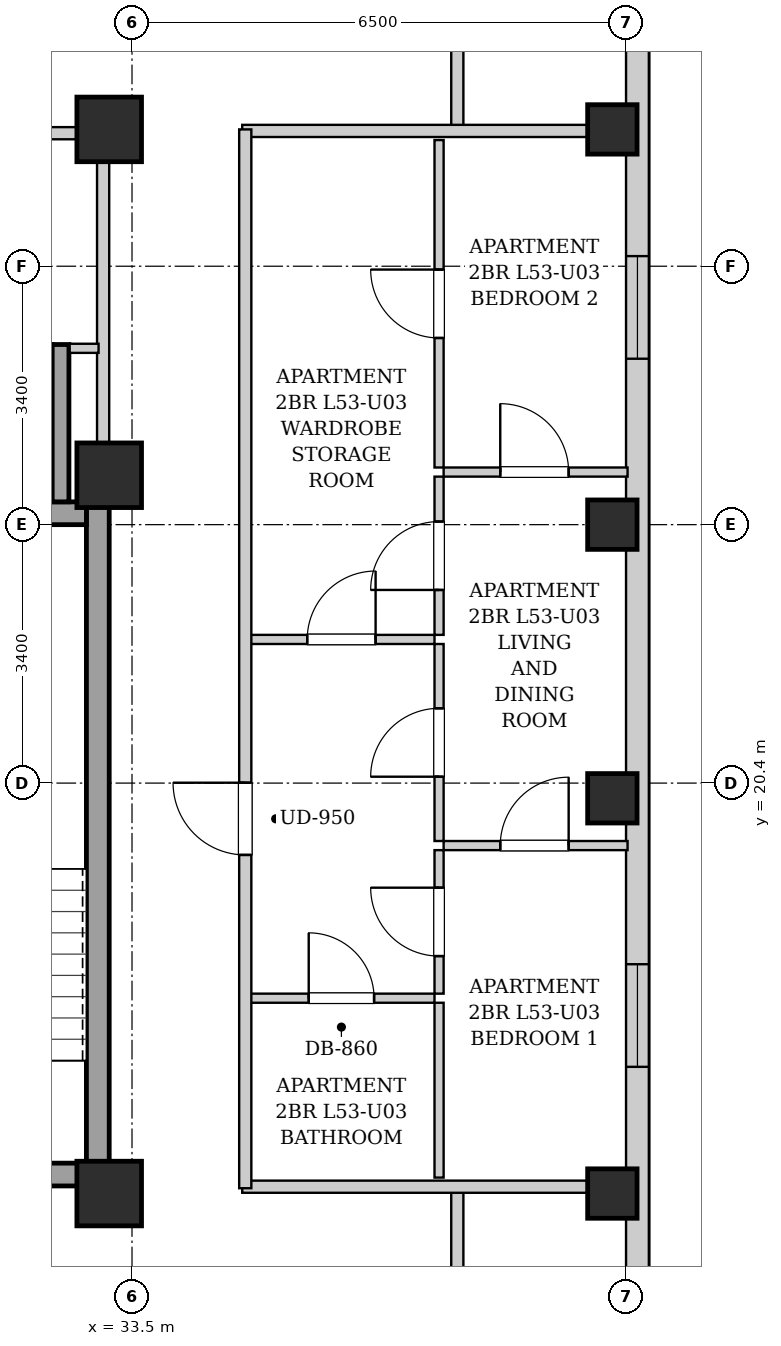
"""IFC4 building model, lengths in metres.
Left out: names, types, materials, properties, quantities, classifications, styles, units other than length and angle.
Written with IfcOpenShell. Run it as: python <this file> out.ifc"""

import sys

from ifc_helpers import new_model, si_unit, direction, frame, frame_2d, origin, origin_2d, place, context, subcontext, project, spatial, rectangle, extrude, element, fill, save


model = new_model("IFC4")
c1 = context("Model", 3, precision=1e-05, world=origin(), true_north=direction((0.0, 1.0)))
c2 = subcontext(c1, "Body", "Model", "MODEL_VIEW")
j1 = project(units=[si_unit("LENGTHUNIT", "METRE"), si_unit("PLANEANGLEUNIT", "RADIAN")], contexts=[c1])
p1 = place(None, origin())
s1 = spatial("IfcSite", under=j1, at=p1, CompositionType="ELEMENT")
p2 = place(p1, origin())
s2 = spatial("IfcBuilding", under=s1, at=p2, CompositionType="ELEMENT")
p3 = place(p2, frame((0.0, 0.0, 184.3)))
s3 = spatial("IfcBuildingStorey", under=s2, at=p3, CompositionType="ELEMENT", Elevation=184.3)
for number, where, z_axis, x_axis in (
    (1, (39.82, 15.0, 0.0), (0.0, 0.0, 1.0), (1.0, 0.0, 0.0)),
    (2, (39.82, 20.2, 0.0), (0.0, 0.0, 1.0), (1.0, 0.0, 0.0)),
    (3, (39.82, 23.8, 0.0), (0.0, 0.0, 1.0), (1.0, 0.0, 0.0)),
    (4, (39.82, 29.0, 0.0), (0.0, 0.0, 1.0), (1.0, 0.0, 0.0)),
):
    element("IfcColumn", number, at=place(p3, frame(where, z_axis=z_axis, x_axis=x_axis)), inside=s3, PredefinedType="COLUMN", context=c2, shape_type="SweptSolid", body=[
        extrude(rectangle(XDim=0.65, YDim=0.65, at=origin_2d()), origin(), (0.0, 0.0, 1.0), 3.3),
    ])
for number, where, z_axis, x_axis in (
    (5, (33.2, 15.0, 0.0), (0.0, 0.0, 1.0), (1.0, 0.0, 0.0)),
    (6, (33.2, 29.0, 0.0), (0.0, 0.0, 1.0), (1.0, 0.0, 0.0)),
    (7, (33.2, 24.45, 0.0), (0.0, 0.0, 1.0), (1.0, 0.0, 0.0)),
):
    element("IfcColumn", number, at=place(p3, frame(where, z_axis=z_axis, x_axis=x_axis)), inside=s3, PredefinedType="COLUMN", context=c2, shape_type="SweptSolid", body=[
        extrude(rectangle(XDim=0.85, YDim=0.85, at=origin_2d()), origin(), (0.0, 0.0, 1.0), 3.3),
    ])
p4 = place(p3, frame((40.15, 37.7, 0.0), z_axis=(0.0, 0.0, 1.0), x_axis=(0.0, -1.0, 0.0)))
e8 = element("IfcWall", 8, at=p4, inside=s3, PredefinedType="SOLIDWALL", context=c2, shape_type="SweptSolid", body=[
    extrude(rectangle(XDim=31.4, YDim=0.3, at=frame_2d((15.7, 0.0))), origin(), (0.0, 0.0, 1.0), 3.04),
])
p5 = place(p4, frame((28.396, 0.0, 0.55)))
e9 = element("IfcOpeningElement", 9, at=p5, cuts=e8, PredefinedType="OPENING", context=c2, shape_type="SweptSolid", body=[
    extrude(rectangle(XDim=1.35, YDim=1.2, at=frame_2d((0.675, 0.6))), frame((0.0, 0.16, 0.0), z_axis=(0.0, -1.0, 0.0), x_axis=(1.0, 0.0, 0.0)), (0.0, 0.0, 1.0), 0.32),
])
p6 = place(p4, frame((1.653, 0.0, 0.55)))
e10 = element("IfcOpeningElement", 10, at=p6, cuts=e8, PredefinedType="OPENING", context=c2, shape_type="SweptSolid", body=[
    extrude(rectangle(XDim=1.35, YDim=1.2, at=frame_2d((0.675, 0.6))), frame((0.0, 0.16, 0.0), z_axis=(0.0, -1.0, 0.0), x_axis=(1.0, 0.0, 0.0)), (0.0, 0.0, 1.0), 0.32),
])
p7 = place(p4, frame((19.683, 0.0, 0.55)))
e11 = element("IfcOpeningElement", 11, at=p7, cuts=e8, PredefinedType="OPENING", context=c2, shape_type="SweptSolid", body=[
    extrude(rectangle(XDim=1.35, YDim=1.2, at=frame_2d((0.675, 0.6))), frame((0.0, 0.16, 0.0), z_axis=(0.0, -1.0, 0.0), x_axis=(1.0, 0.0, 0.0)), (0.0, 0.0, 1.0), 0.32),
])
p8 = place(p4, frame((10.367, 0.0, 0.55)))
e12 = element("IfcOpeningElement", 12, at=p8, cuts=e8, PredefinedType="OPENING", context=c2, shape_type="SweptSolid", body=[
    extrude(rectangle(XDim=1.35, YDim=1.2, at=frame_2d((0.675, 0.6))), frame((0.0, 0.16, 0.0), z_axis=(0.0, -1.0, 0.0), x_axis=(1.0, 0.0, 0.0)), (0.0, 0.0, 1.0), 0.32),
])
p9 = place(p3, frame((33.05, 15.1, 0.0), z_axis=(0.0, 0.0, 1.0), x_axis=(0.0, 1.0, 0.0)))
e13 = element("IfcWall", 13, at=p9, inside=s3, PredefinedType="SHEAR", context=c2, shape_type="SweptSolid", body=[
    extrude(rectangle(XDim=9.0, YDim=0.3, at=frame_2d((4.5, 0.0))), origin(), (0.0, 0.0, 1.0), 3.04),
])
p10 = place(p3, frame((30.05, 23.95, 0.0), z_axis=(0.0, 0.0, 1.0), x_axis=(1.0, 0.0, 0.0)))
e14 = element("IfcWall", 14, at=p10, inside=s3, PredefinedType="SHEAR", context=c2, shape_type="SweptSolid", body=[
    extrude(rectangle(XDim=2.85, YDim=0.3, at=frame_2d((1.425, 0.0))), origin(), (0.0, 0.0, 1.0), 3.04),
])
p11 = place(p3, frame((30.05, 15.25, 0.0), z_axis=(0.0, 0.0, 1.0), x_axis=(1.0, 0.0, 0.0)))
e15 = element("IfcWall", 15, at=p11, inside=s3, PredefinedType="SHEAR", context=c2, shape_type="SweptSolid", body=[
    extrude(rectangle(XDim=2.85, YDim=0.3, at=frame_2d((1.425, 0.0))), origin(), (0.0, 0.0, 1.0), 3.04),
])
p12 = place(p11, frame((0.86, 0.0, 0.0)))
e16 = element("IfcOpeningElement", 16, at=p12, cuts=e15, PredefinedType="OPENING", context=c2, shape_type="SweptSolid", body=[
    extrude(rectangle(XDim=1.1, YDim=2.05, at=frame_2d((0.55, 1.025))), frame((0.0, 0.16, 0.0), z_axis=(0.0, -1.0, 0.0), x_axis=(1.0, 0.0, 0.0)), (0.0, 0.0, 1.0), 0.32),
])
p13 = place(p3, frame((32.56, 24.1, 0.0), z_axis=(0.0, 0.0, 1.0), x_axis=(0.0, 1.0, 0.0)))
e17 = element("IfcWall", 17, at=p13, inside=s3, PredefinedType="SHEAR", context=c2, shape_type="SweptSolid", body=[
    extrude(rectangle(XDim=2.07, YDim=0.22, at=frame_2d((1.035, 0.0))), origin(), (0.0, 0.0, 1.0), 3.04),
])
p14 = place(p3, frame((33.12, 24.12, 0.0), z_axis=(0.0, 0.0, 1.0), x_axis=(0.0, 1.0, 0.0)))
e18 = element("IfcWall", 18, at=p14, inside=s3, PredefinedType="PARTITIONING", context=c2, shape_type="SweptSolid", body=[
    extrude(rectangle(XDim=4.76, YDim=0.16, at=frame_2d((2.38, 0.0))), origin(), (0.0, 0.0, 1.0), 3.04),
])
p15 = place(p3, frame((32.68, 26.12, 0.0), z_axis=(0.0, 0.0, 1.0), x_axis=(1.0, 0.0, 0.0)))
e19 = element("IfcWall", 19, at=p15, inside=s3, PredefinedType="PARTITIONING", context=c2, shape_type="SweptSolid", body=[
    extrude(rectangle(XDim=0.38, YDim=0.12, at=frame_2d((0.19, 0.0))), origin(), (0.0, 0.0, 1.0), 3.04),
])
p16 = place(p3, frame((30.08, 28.95, 0.0), z_axis=(0.0, 0.0, 1.0), x_axis=(1.0, 0.0, 0.0)))
e20 = element("IfcWall", 20, at=p16, inside=s3, PredefinedType="PARTITIONING", context=c2, shape_type="SweptSolid", body=[
    extrude(rectangle(XDim=2.96, YDim=0.16, at=frame_2d((1.48, 0.0))), origin(), (0.0, 0.0, 1.0), 3.04),
])
p17 = place(p16, frame((1.045, 0.0, 0.0)))
e21 = element("IfcOpeningElement", 21, at=p17, cuts=e20, PredefinedType="OPENING", context=c2, shape_type="SweptSolid", body=[
    extrude(rectangle(XDim=0.86, YDim=2.05, at=frame_2d((0.43, 1.025))), frame((0.0, 0.09, 0.0), z_axis=(0.0, -1.0, 0.0), x_axis=(1.0, 0.0, 0.0)), (0.0, 0.0, 1.0), 0.18),
])
for number, where, z_axis, x_axis in (
    (22, (37.78, 13.51, 0.0), (0.0, 0.0, 1.0), (0.0, 1.0, 0.0)),
    (23, (37.78, 28.98, 0.0), (0.0, 0.0, 1.0), (0.0, 1.0, 0.0)),
):
    element("IfcWall", number, at=place(p3, frame(where, z_axis=z_axis, x_axis=x_axis)), inside=s3, PredefinedType="PARTITIONING", context=c2, shape_type="SweptSolid", body=[
        extrude(rectangle(XDim=1.58, YDim=0.16, at=frame_2d((0.79, 0.0))), origin(), (0.0, 0.0, 1.0), 3.04),
    ])
for number, where, z_axis, x_axis in (
    (24, (34.95, 15.09, 0.0), (0.0, 0.0, 1.0), (1.0, 0.0, 0.0)),
    (25, (34.95, 28.98, 0.0), (0.0, 0.0, 1.0), (1.0, 0.0, 0.0)),
):
    element("IfcWall", number, at=place(p3, frame(where, z_axis=z_axis, x_axis=x_axis)), inside=s3, PredefinedType="PARTITIONING", context=c2, shape_type="SweptSolid", body=[
        extrude(rectangle(XDim=5.07, YDim=0.16, at=frame_2d((2.535, 0.0))), origin(), (0.0, 0.0, 1.0), 2.556),
    ])
p18 = place(p3, frame((35.03, 22.29, 0.0), z_axis=(0.0, 0.0, 1.0), x_axis=(1.0, 0.0, 0.0)))
e26 = element("IfcWall", 26, at=p18, inside=s3, PredefinedType="PARTITIONING", context=c2, shape_type="SweptSolid", body=[
    extrude(rectangle(XDim=2.45, YDim=0.12, at=frame_2d((1.225, 0.0))), origin(), (0.0, 0.0, 1.0), 3.04),
])
p19 = place(p18, frame((0.775, 0.0, 0.0)))
e27 = element("IfcOpeningElement", 27, at=p19, cuts=e26, PredefinedType="OPENING", context=c2, shape_type="SweptSolid", body=[
    extrude(rectangle(XDim=0.9, YDim=2.05, at=frame_2d((0.45, 1.025))), frame((0.0, 0.07, 0.0), z_axis=(0.0, -1.0, 0.0), x_axis=(1.0, 0.0, 0.0)), (0.0, 0.0, 1.0), 0.14),
])
p20 = place(p3, frame((37.54, 22.35, 0.0), z_axis=(0.0, 0.0, 1.0), x_axis=(0.0, 1.0, 0.0)))
e28 = element("IfcWall", 28, at=p20, inside=s3, PredefinedType="PARTITIONING", context=c2, shape_type="SweptSolid", body=[
    extrude(rectangle(XDim=2.082, YDim=0.12, at=frame_2d((1.041, 0.0))), origin(), (0.0, 0.0, 1.0), 3.04),
])
p21 = place(p20, frame((0.591, 0.0, 0.0)))
e29 = element("IfcOpeningElement", 29, at=p21, cuts=e28, PredefinedType="OPENING", context=c2, shape_type="SweptSolid", body=[
    extrude(rectangle(XDim=0.9, YDim=2.05, at=frame_2d((0.45, 1.025))), frame((0.0, 0.07, 0.0), z_axis=(0.0, -1.0, 0.0), x_axis=(1.0, 0.0, 0.0)), (0.0, 0.0, 1.0), 0.14),
])
p22 = place(p3, frame((37.54, 24.552, 0.0), z_axis=(0.0, 0.0, 1.0), x_axis=(0.0, 1.0, 0.0)))
e30 = element("IfcWall", 30, at=p22, inside=s3, PredefinedType="PARTITIONING", context=c2, shape_type="SweptSolid", body=[
    extrude(rectangle(XDim=4.308, YDim=0.12, at=frame_2d((2.154, 0.0))), origin(), (0.0, 0.0, 1.0), 3.04),
])
p23 = place(p22, frame((1.704, 0.0, 0.0)))
e31 = element("IfcOpeningElement", 31, at=p23, cuts=e30, PredefinedType="OPENING", context=c2, shape_type="SweptSolid", body=[
    extrude(rectangle(XDim=0.9, YDim=2.05, at=frame_2d((0.45, 1.025))), frame((0.0, 0.07, 0.0), z_axis=(0.0, -1.0, 0.0), x_axis=(1.0, 0.0, 0.0)), (0.0, 0.0, 1.0), 0.14),
])
p24 = place(p3, frame((35.03, 17.57, 0.0), z_axis=(0.0, 0.0, 1.0), x_axis=(1.0, 0.0, 0.0)))
e32 = element("IfcWall", 32, at=p24, inside=s3, PredefinedType="PARTITIONING", context=c2, shape_type="SweptSolid", body=[
    extrude(rectangle(XDim=2.45, YDim=0.12, at=frame_2d((1.225, 0.0))), origin(), (0.0, 0.0, 1.0), 3.04),
])
p25 = place(p24, frame((0.795, 0.0, 0.0)))
e33 = element("IfcOpeningElement", 33, at=p25, cuts=e32, PredefinedType="OPENING", context=c2, shape_type="SweptSolid", body=[
    extrude(rectangle(XDim=0.86, YDim=2.05, at=frame_2d((0.43, 1.025))), frame((0.0, 0.07, 0.0), z_axis=(0.0, -1.0, 0.0), x_axis=(1.0, 0.0, 0.0)), (0.0, 0.0, 1.0), 0.14),
])
p26 = place(p3, frame((37.54, 15.21, 0.0), z_axis=(0.0, 0.0, 1.0), x_axis=(0.0, 1.0, 0.0)))
e34 = element("IfcWall", 34, at=p26, inside=s3, PredefinedType="PARTITIONING", context=c2, shape_type="SweptSolid", body=[
    extrude(rectangle(XDim=2.3, YDim=0.12, at=frame_2d((1.15, 0.0))), origin(), (0.0, 0.0, 1.0), 3.04),
])
p27 = place(p3, frame((37.54, 17.63, 0.0), z_axis=(0.0, 0.0, 1.0), x_axis=(0.0, 1.0, 0.0)))
e35 = element("IfcWall", 35, at=p27, inside=s3, PredefinedType="PARTITIONING", context=c2, shape_type="SweptSolid", body=[
    extrude(rectangle(XDim=1.888, YDim=0.12, at=frame_2d((0.944, 0.0))), origin(), (0.0, 0.0, 1.0), 3.04),
])
p28 = place(p27, frame((0.494, 0.0, 0.0)))
e36 = element("IfcOpeningElement", 36, at=p28, cuts=e35, PredefinedType="OPENING", context=c2, shape_type="SweptSolid", body=[
    extrude(rectangle(XDim=0.9, YDim=2.05, at=frame_2d((0.45, 1.025))), frame((0.0, 0.07, 0.0), z_axis=(0.0, -1.0, 0.0), x_axis=(1.0, 0.0, 0.0)), (0.0, 0.0, 1.0), 0.14),
])
p29 = place(p3, frame((37.54, 19.638, 0.0), z_axis=(0.0, 0.0, 1.0), x_axis=(0.0, 1.0, 0.0)))
e37 = element("IfcWall", 37, at=p29, inside=s3, PredefinedType="PARTITIONING", context=c2, shape_type="SweptSolid", body=[
    extrude(rectangle(XDim=2.592, YDim=0.12, at=frame_2d((1.296, 0.0))), origin(), (0.0, 0.0, 1.0), 3.04),
])
p30 = place(p29, frame((0.846, 0.0, 0.0)))
e38 = element("IfcOpeningElement", 38, at=p30, cuts=e37, PredefinedType="OPENING", context=c2, shape_type="SweptSolid", body=[
    extrude(rectangle(XDim=0.9, YDim=2.05, at=frame_2d((0.45, 1.025))), frame((0.0, 0.07, 0.0), z_axis=(0.0, -1.0, 0.0), x_axis=(1.0, 0.0, 0.0)), (0.0, 0.0, 1.0), 0.14),
])
p31 = place(p3, frame((37.6, 19.578, 0.0), z_axis=(0.0, 0.0, 1.0), x_axis=(1.0, 0.0, 0.0)))
e39 = element("IfcWall", 39, at=p31, inside=s3, PredefinedType="PARTITIONING", context=c2, shape_type="SweptSolid", body=[
    extrude(rectangle(XDim=2.42, YDim=0.12, at=frame_2d((1.21, 0.0))), origin(), (0.0, 0.0, 1.0), 3.04),
])
p32 = place(p31, frame((0.745, 0.0, 0.0)))
e40 = element("IfcOpeningElement", 40, at=p32, cuts=e39, PredefinedType="OPENING", context=c2, shape_type="SweptSolid", body=[
    extrude(rectangle(XDim=0.9, YDim=2.05, at=frame_2d((0.45, 1.025))), frame((0.0, 0.07, 0.0), z_axis=(0.0, -1.0, 0.0), x_axis=(1.0, 0.0, 0.0)), (0.0, 0.0, 1.0), 0.14),
])
p33 = place(p3, frame((37.6, 24.492, 0.0), z_axis=(0.0, 0.0, 1.0), x_axis=(1.0, 0.0, 0.0)))
e41 = element("IfcWall", 41, at=p33, inside=s3, PredefinedType="PARTITIONING", context=c2, shape_type="SweptSolid", body=[
    extrude(rectangle(XDim=2.42, YDim=0.12, at=frame_2d((1.21, 0.0))), origin(), (0.0, 0.0, 1.0), 2.722),
])
p34 = place(p33, frame((0.745, 0.0, 0.0)))
e42 = element("IfcOpeningElement", 42, at=p34, cuts=e41, PredefinedType="OPENING", context=c2, shape_type="SweptSolid", body=[
    extrude(rectangle(XDim=0.9, YDim=2.05, at=frame_2d((0.45, 1.025))), frame((0.0, 0.07, 0.0), z_axis=(0.0, -1.0, 0.0), x_axis=(1.0, 0.0, 0.0)), (0.0, 0.0, 1.0), 0.14),
])
p35 = place(p3, frame((34.99, 15.07, 0.0), z_axis=(0.0, 0.0, 1.0), x_axis=(0.0, 1.0, 0.0)))
e43 = element("IfcWall", 43, at=p35, inside=s3, PredefinedType="PARTITIONING", context=c2, shape_type="SweptSolid", body=[
    extrude(rectangle(XDim=13.93, YDim=0.16, at=frame_2d((6.965, 0.0))), origin(), (0.0, 0.0, 1.0), 3.04),
])
p36 = place(p35, frame((4.385, 0.0, 0.0)))
e44 = element("IfcOpeningElement", 44, at=p36, cuts=e43, PredefinedType="OPENING", context=c2, shape_type="SweptSolid", body=[
    extrude(rectangle(XDim=0.95, YDim=2.1, at=frame_2d((0.475, 1.05))), frame((0.0, 0.09, 0.0), z_axis=(0.0, -1.0, 0.0), x_axis=(1.0, 0.0, 0.0)), (0.0, 0.0, 1.0), 0.18),
])
p37 = place(p19, origin())
e45 = element("IfcDoor", 45, at=p37, inside=s3, OperationType="SINGLE_SWING_RIGHT", PredefinedType="DOOR", context=c2, shape_type="SweptSolid", body=[
    extrude(rectangle(XDim=0.9, YDim=2.05, at=frame_2d((0.45, 1.025))), frame((0.0, 0.025, 0.0), z_axis=(0.0, -1.0, 0.0), x_axis=(1.0, 0.0, 0.0)), (0.0, 0.0, 1.0), 0.05),
])
fill(e27, e45)
p38 = place(p21, origin())
e46 = element("IfcDoor", 46, at=p38, inside=s3, OperationType="SINGLE_SWING_LEFT", PredefinedType="DOOR", context=c2, shape_type="SweptSolid", body=[
    extrude(rectangle(XDim=0.9, YDim=2.05, at=frame_2d((0.45, 1.025))), frame((0.0, 0.025, 0.0), z_axis=(0.0, -1.0, 0.0), x_axis=(1.0, 0.0, 0.0)), (0.0, 0.0, 1.0), 0.05),
])
fill(e29, e46)
p39 = place(p23, origin())
e47 = element("IfcDoor", 47, at=p39, inside=s3, OperationType="SINGLE_SWING_RIGHT", PredefinedType="DOOR", context=c2, shape_type="SweptSolid", body=[
    extrude(rectangle(XDim=0.9, YDim=2.05, at=frame_2d((0.45, 1.025))), frame((0.0, 0.025, 0.0), z_axis=(0.0, -1.0, 0.0), x_axis=(1.0, 0.0, 0.0)), (0.0, 0.0, 1.0), 0.05),
])
fill(e31, e47)
p40 = place(p25, origin())
e48 = element("IfcDoor", 48, at=p40, inside=s3, OperationType="SINGLE_SWING_LEFT", PredefinedType="DOOR", context=c2, shape_type="SweptSolid", body=[
    extrude(rectangle(XDim=0.86, YDim=2.05, at=frame_2d((0.43, 1.025))), frame((0.0, 0.025, 0.0), z_axis=(0.0, -1.0, 0.0), x_axis=(1.0, 0.0, 0.0)), (0.0, 0.0, 1.0), 0.05),
])
fill(e33, e48)
p41 = place(p28, origin())
e49 = element("IfcDoor", 49, at=p41, inside=s3, OperationType="SINGLE_SWING_RIGHT", PredefinedType="DOOR", context=c2, shape_type="SweptSolid", body=[
    extrude(rectangle(XDim=0.9, YDim=2.05, at=frame_2d((0.45, 1.025))), frame((0.0, 0.025, 0.0), z_axis=(0.0, -1.0, 0.0), x_axis=(1.0, 0.0, 0.0)), (0.0, 0.0, 1.0), 0.05),
])
fill(e36, e49)
p42 = place(p30, origin())
e50 = element("IfcDoor", 50, at=p42, inside=s3, OperationType="SINGLE_SWING_LEFT", PredefinedType="DOOR", context=c2, shape_type="SweptSolid", body=[
    extrude(rectangle(XDim=0.9, YDim=2.05, at=frame_2d((0.45, 1.025))), frame((0.0, 0.025, 0.0), z_axis=(0.0, -1.0, 0.0), x_axis=(1.0, 0.0, 0.0)), (0.0, 0.0, 1.0), 0.05),
])
fill(e38, e50)
p43 = place(p32, origin())
e51 = element("IfcDoor", 51, at=p43, inside=s3, OperationType="SINGLE_SWING_RIGHT", PredefinedType="DOOR", context=c2, shape_type="SweptSolid", body=[
    extrude(rectangle(XDim=0.9, YDim=2.05, at=frame_2d((0.45, 1.025))), frame((0.0, 0.025, 0.0), z_axis=(0.0, -1.0, 0.0), x_axis=(1.0, 0.0, 0.0)), (0.0, 0.0, 1.0), 0.05),
])
fill(e40, e51)
p44 = place(p34, origin())
e52 = element("IfcDoor", 52, at=p44, inside=s3, OperationType="SINGLE_SWING_LEFT", PredefinedType="DOOR", context=c2, shape_type="SweptSolid", body=[
    extrude(rectangle(XDim=0.9, YDim=2.05, at=frame_2d((0.45, 1.025))), frame((0.0, 0.025, 0.0), z_axis=(0.0, -1.0, 0.0), x_axis=(1.0, 0.0, 0.0)), (0.0, 0.0, 1.0), 0.05),
])
fill(e42, e52)
p45 = place(p36, origin())
e53 = element("IfcDoor", 53, at=p45, inside=s3, OperationType="SINGLE_SWING_RIGHT", PredefinedType="DOOR", context=c2, shape_type="SweptSolid", body=[
    extrude(rectangle(XDim=0.95, YDim=2.1, at=frame_2d((0.475, 1.05))), frame((0.0, 0.025, 0.0), z_axis=(0.0, -1.0, 0.0), x_axis=(1.0, 0.0, 0.0)), (0.0, 0.0, 1.0), 0.05),
])
fill(e44, e53)
p46 = place(p7, origin())
e54 = element("IfcWindow", 54, at=p46, inside=s3, PartitioningType="SINGLE_PANEL", PredefinedType="WINDOW", context=c2, shape_type="SweptSolid", body=[
    extrude(rectangle(XDim=1.35, YDim=1.2, at=frame_2d((0.675, 0.6))), frame((0.0, 0.03, 0.0), z_axis=(0.0, -1.0, 0.0), x_axis=(1.0, 0.0, 0.0)), (0.0, 0.0, 1.0), 0.06),
])
fill(e11, e54)
p47 = place(p8, origin())
e55 = element("IfcWindow", 55, at=p47, inside=s3, PartitioningType="SINGLE_PANEL", PredefinedType="WINDOW", context=c2, shape_type="SweptSolid", body=[
    extrude(rectangle(XDim=1.35, YDim=1.2, at=frame_2d((0.675, 0.6))), frame((0.0, 0.03, 0.0), z_axis=(0.0, -1.0, 0.0), x_axis=(1.0, 0.0, 0.0)), (0.0, 0.0, 1.0), 0.06),
])
fill(e12, e55)
save(model, sys.argv[1])
